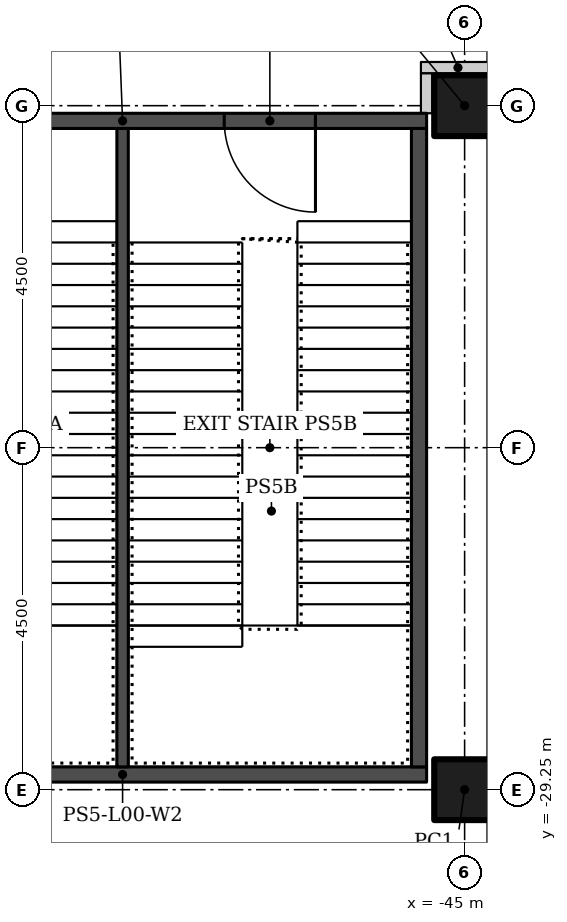
"""IFC4 building model, lengths in metres.
Left out: names, types, materials, properties, quantities, classifications, styles, units other than length and angle.
Written with IfcOpenShell. Run it as: python <this file> out.ifc"""

import sys

from ifc_helpers import new_model, si_unit, direction, frame, frame_2d, origin, origin_2d, place, context, subcontext, project, spatial, rectangle, hollow_rectangle, extrude, element, fill, save


model = new_model("IFC4")
c1 = context("Model", 3, precision=1e-05, world=origin(), true_north=direction((0.0, 1.0)))
c2 = subcontext(c1, "Body", "Model", "MODEL_VIEW")
j1 = project(units=[si_unit("LENGTHUNIT", "METRE"), si_unit("PLANEANGLEUNIT", "RADIAN")], contexts=[c1])
p1 = place(None, origin())
s1 = spatial("IfcSite", under=j1, at=p1, CompositionType="ELEMENT")
p2 = place(p1, origin())
s2 = spatial("IfcBuilding", under=s1, at=p2, CompositionType="ELEMENT")
p3 = place(p2, origin())
s3 = spatial("IfcBuildingStorey", under=s2, at=p3, CompositionType="ELEMENT", Elevation=0.0)
for number, where in (
    (1, (-45.0, -29.25, 0.0)),
    (2, (-45.0, -20.25, 0.0)),
):
    element("IfcColumn", number, at=place(p3, frame(where)), inside=s3, PredefinedType="COLUMN", context=c2, shape_type="SweptSolid", body=[
        extrude(hollow_rectangle(XDim=0.8, YDim=0.8, WallThickness=0.03, at=origin_2d()), origin(), (0.0, 0.0, 1.0), 6.1),
    ])
p4 = place(p3, frame((-44.6, -16.55, 0.0), z_axis=(0.0, 0.0, 1.0), x_axis=(0.0, -1.0, 0.0)))
e3 = element("IfcWall", 3, at=p4, inside=s3, PredefinedType="PARTITIONING", context=c2, shape_type="SweptSolid", body=[
    extrude(rectangle(XDim=21.605, YDim=0.2, at=frame_2d((10.802, 0.0))), origin(), (0.0, 0.0, 1.0), 6.1),
])
p5 = place(p4, frame((1.1, 0.0, 0.0)))
e4 = element("IfcOpeningElement", 4, at=p5, cuts=e3, PredefinedType="OPENING", context=c2, shape_type="SweptSolid", body=[
    extrude(rectangle(XDim=1.8, YDim=2.1, at=frame_2d((0.9, 1.05))), frame((0.0, 0.11, 0.0), z_axis=(0.0, -1.0, 0.0), x_axis=(1.0, 0.0, 0.0)), (0.0, 0.0, 1.0), 0.22),
])
p6 = place(p3, frame((-45.575, -19.75, 0.0)))
e5 = element("IfcWall", 5, at=p6, inside=s3, PredefinedType="PARTITIONING", context=c2, shape_type="SweptSolid", body=[
    extrude(rectangle(XDim=0.975, YDim=0.15, at=frame_2d((0.487, 0.0))), origin(), (0.0, 0.0, 1.0), 6.1),
])
p7 = place(p3, frame((-45.5, -20.35, 0.0), z_axis=(0.0, 0.0, 1.0), x_axis=(0.0, 1.0, 0.0)))
e6 = element("IfcWall", 6, at=p7, inside=s3, PredefinedType="PARTITIONING", context=c2, shape_type="SweptSolid", body=[
    extrude(rectangle(XDim=0.525, YDim=0.15, at=frame_2d((0.262, 0.0))), origin(), (0.0, 0.0, 1.0), 6.1),
])
p8 = place(p3, frame((-45.5, -20.45, 0.0), z_axis=(0.0, 0.0, 1.0), x_axis=(-1.0, 0.0, 0.0)))
e7 = element("IfcWall", 7, at=p8, inside=s3, PredefinedType="SHEAR", context=c2, shape_type="SweptSolid", body=[
    extrude(rectangle(XDim=8.0, YDim=0.2, at=frame_2d((4.0, 0.0))), origin(), (0.0, 0.0, 1.0), 6.1),
])
p9 = place(p8, frame((5.337, 0.0, 0.0)))
e8 = element("IfcOpeningElement", 8, at=p9, cuts=e7, PredefinedType="OPENING", context=c2, shape_type="SweptSolid", body=[
    extrude(rectangle(XDim=1.2, YDim=2.4, at=frame_2d((0.6, 1.2))), frame((0.0, 0.11, 0.0), z_axis=(0.0, -1.0, 0.0), x_axis=(1.0, 0.0, 0.0)), (0.0, 0.0, 1.0), 0.22),
])
p10 = place(p8, frame((1.462, 0.0, 0.0)))
e9 = element("IfcOpeningElement", 9, at=p10, cuts=e7, PredefinedType="OPENING", context=c2, shape_type="SweptSolid", body=[
    extrude(rectangle(XDim=1.2, YDim=2.4, at=frame_2d((0.6, 1.2))), frame((0.0, 0.11, 0.0), z_axis=(0.0, -1.0, 0.0), x_axis=(1.0, 0.0, 0.0)), (0.0, 0.0, 1.0), 0.22),
])
p11 = place(p3, frame((-53.5, -29.05, 0.0)))
e10 = element("IfcWall", 10, at=p11, inside=s3, PredefinedType="SHEAR", context=c2, shape_type="SweptSolid", body=[
    extrude(rectangle(XDim=8.0, YDim=0.2, at=frame_2d((4.0, 0.0))), origin(), (0.0, 0.0, 1.0), 6.1),
])
p12 = place(p3, frame((-45.6, -28.95, 0.0), z_axis=(0.0, 0.0, 1.0), x_axis=(0.0, 1.0, 0.0)))
e11 = element("IfcWall", 11, at=p12, inside=s3, PredefinedType="SHEAR", context=c2, shape_type="SweptSolid", body=[
    extrude(rectangle(XDim=8.4, YDim=0.2, at=frame_2d((4.2, 0.0))), origin(), (0.0, 0.0, 1.0), 6.1),
])
p13 = place(p3, frame((-49.5, -28.95, 0.0), z_axis=(0.0, 0.0, 1.0), x_axis=(0.0, 1.0, 0.0)))
e12 = element("IfcWall", 12, at=p13, inside=s3, PredefinedType="SHEAR", context=c2, shape_type="SweptSolid", body=[
    extrude(rectangle(XDim=8.4, YDim=0.15, at=frame_2d((4.2, 0.0))), origin(), (0.0, 0.0, 1.0), 6.1),
])
p14 = place(p10, origin())
e13 = element("IfcDoor", 13, at=p14, inside=s3, OperationType="SINGLE_SWING_RIGHT", PredefinedType="DOOR", context=c2, shape_type="SweptSolid", body=[
    extrude(rectangle(XDim=1.2, YDim=2.4, at=frame_2d((0.6, 1.2))), frame((0.0, 0.025, 0.0), z_axis=(0.0, -1.0, 0.0), x_axis=(1.0, 0.0, 0.0)), (0.0, 0.0, 1.0), 0.05),
])
fill(e9, e13)
save(model, sys.argv[1])
